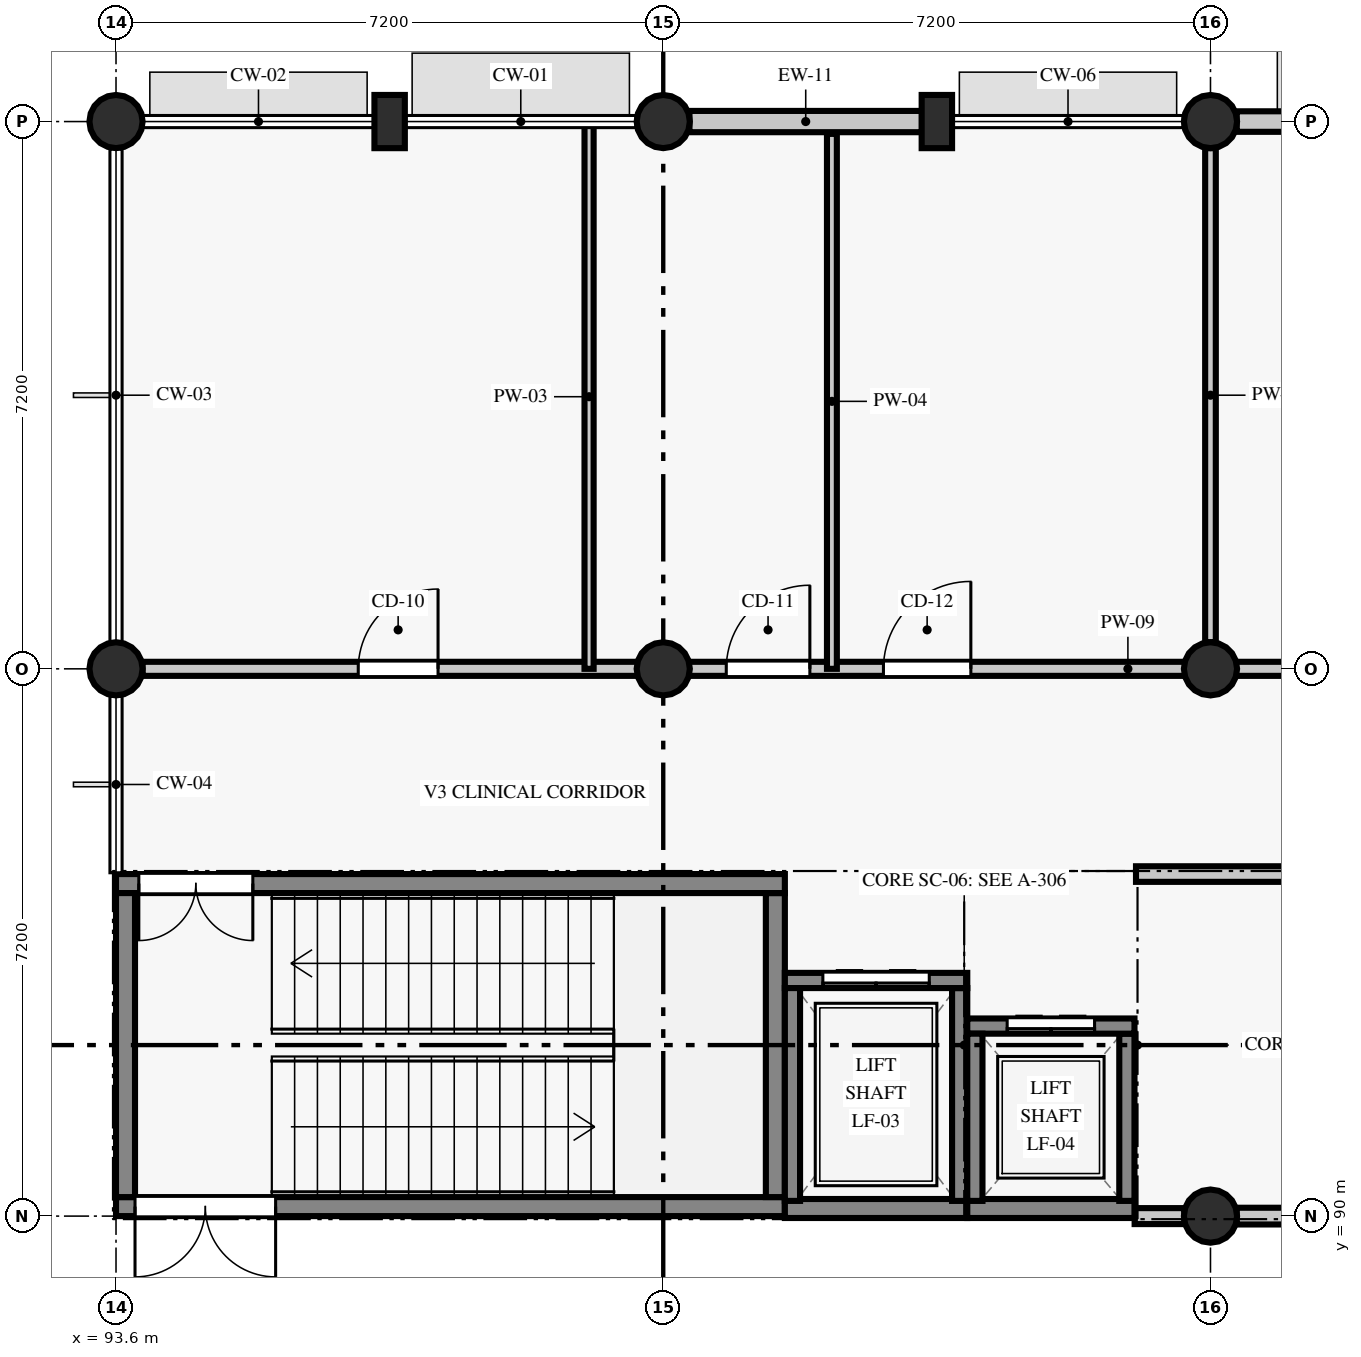
"""IFC4 building model, lengths in metres.
Left out: names, types, materials, properties, quantities, classifications, styles, units other than length and angle.
Written with IfcOpenShell. Run it as: python <this file> out.ifc"""

import sys

from ifc_helpers import new_model, si_unit, direction, frame, frame_2d, origin, origin_2d, place, context, subcontext, project, spatial, rectangle, circle, extrude, element, fill, save


model = new_model("IFC4")
c1 = context("Model", 3, precision=1e-05, world=origin(), true_north=direction((0.0, 1.0)))
c2 = subcontext(c1, "Body", "Model", "MODEL_VIEW")
j1 = project(units=[si_unit("LENGTHUNIT", "METRE"), si_unit("PLANEANGLEUNIT", "RADIAN")], contexts=[c1])
p1 = place(None, origin())
s1 = spatial("IfcSite", under=j1, at=p1, CompositionType="ELEMENT")
p2 = place(p1, origin())
s2 = spatial("IfcBuilding", under=s1, at=p2, CompositionType="ELEMENT")
p3 = place(p2, origin())
s3 = spatial("IfcBuildingStorey", under=s2, at=p3, CompositionType="ELEMENT", Elevation=0.0)
for number, where, z_axis, x_axis in (
    (1, (93.6, 97.2, 0.0), (0.0, 0.0, 1.0), (1.0, 0.0, 0.0)),
    (2, (93.6, 104.4, 0.0), (0.0, 0.0, 1.0), (1.0, 0.0, 0.0)),
    (3, (100.8, 97.2, 0.0), (0.0, 0.0, 1.0), (1.0, 0.0, 0.0)),
    (4, (100.8, 104.4, 0.0), (0.0, 0.0, 1.0), (1.0, 0.0, 0.0)),
    (5, (108.0, 90.0, 0.0), (0.0, 0.0, 1.0), (1.0, 0.0, 0.0)),
    (6, (108.0, 97.2, 0.0), (0.0, 0.0, 1.0), (1.0, 0.0, 0.0)),
    (7, (108.0, 104.4, 0.0), (0.0, 0.0, 1.0), (1.0, 0.0, 0.0)),
):
    element("IfcColumn", number, at=place(p3, frame(where, z_axis=z_axis, x_axis=x_axis)), inside=s3, PredefinedType="COLUMN", context=c2, shape_type="SweptSolid", body=[
        extrude(circle(Radius=0.35, at=origin_2d()), origin(), (0.0, 0.0, 1.0), 4.535),
    ])
for number, where, z_axis, x_axis in (
    (8, (97.2, 104.4, 0.0), (0.0, 0.0, 1.0), (1.0, 0.0, 0.0)),
    (9, (104.4, 104.4, 0.0), (0.0, 0.0, 1.0), (1.0, 0.0, 0.0)),
):
    element("IfcColumn", number, at=place(p3, frame(where, z_axis=z_axis, x_axis=x_axis)), inside=s3, PredefinedType="PILASTER", context=c2, shape_type="SweptSolid", body=[
        extrude(rectangle(XDim=0.4, YDim=0.7, at=origin_2d()), origin(), (0.0, 0.0, 1.0), 4.535),
    ])
p4 = place(p3, frame((107.002, 90.0, 0.0), z_axis=(0.0, 0.0, 1.0), x_axis=(1.0, 0.0, 0.0)))
e10 = element("IfcWall", 10, at=p4, inside=s3, PredefinedType="STANDARD", context=c2, shape_type="SweptSolid", body=[
    extrude(rectangle(XDim=0.653, YDim=0.21, at=frame_2d((0.327, 0.0))), origin(), (0.0, 0.0, 1.0), 4.535),
])
p5 = place(p3, frame((108.345, 90.0, 0.0), z_axis=(0.0, 0.0, 1.0), x_axis=(1.0, 0.0, 0.0)))
e11 = element("IfcWall", 11, at=p5, inside=s3, PredefinedType="STANDARD", context=c2, shape_type="SweptSolid", body=[
    extrude(rectangle(XDim=5.253, YDim=0.22, at=frame_2d((2.626, 0.0))), origin(), (0.0, 0.0, 1.0), 4.535),
])
p6 = place(p5, frame((1.677, 0.0, 0.0)))
e12 = element("IfcOpeningElement", 12, at=p6, cuts=e11, PredefinedType="OPENING", context=c2, shape_type="SweptSolid", body=[
    extrude(rectangle(XDim=1.9, YDim=2.28, at=frame_2d((0.95, 1.14))), frame((0.0, 0.12, 0.0), z_axis=(0.0, -1.0, 0.0), x_axis=(1.0, 0.0, 0.0)), (0.0, 0.0, 1.0), 0.24),
])
p7 = place(p3, frame((111.404, 104.4, 0.0), z_axis=(0.0, 0.0, 1.0), x_axis=(-1.0, 0.0, 0.0)))
e13 = element("IfcWall", 13, at=p7, inside=s3, PredefinedType="STANDARD", context=c2, shape_type="SweptSolid", body=[
    extrude(rectangle(XDim=3.059, YDim=0.27, at=frame_2d((1.53, 0.0))), origin(), (0.0, 0.0, 1.0), 2.9),
])
p8 = place(p7, frame((0.655, 0.0, 0.9)))
e14 = element("IfcOpeningElement", 14, at=p8, cuts=e13, PredefinedType="OPENING", context=c2, shape_type="SweptSolid", body=[
    extrude(rectangle(XDim=1.75, YDim=1.66, at=frame_2d((0.875, 0.83))), frame((0.0, 0.145, 0.0), z_axis=(0.0, -1.0, 0.0), x_axis=(1.0, 0.0, 0.0)), (0.0, 0.0, 1.0), 0.29),
])
p9 = place(p3, frame((104.204, 104.4, 0.0), z_axis=(0.0, 0.0, 1.0), x_axis=(-1.0, 0.0, 0.0)))
e15 = element("IfcWall", 15, at=p9, inside=s3, PredefinedType="STANDARD", context=c2, shape_type="SweptSolid", body=[
    extrude(rectangle(XDim=3.059, YDim=0.28, at=frame_2d((1.53, 0.0))), origin(), (0.0, 0.0, 1.0), 2.9),
])
p10 = place(p3, frame((93.6, 90.125, 0.0), z_axis=(0.0, 0.0, 1.0), x_axis=(1.0, 0.0, 0.0)))
e16 = element("IfcWall", 16, at=p10, inside=s3, PredefinedType="SHEAR", context=c2, shape_type="SweptSolid", body=[
    extrude(rectangle(XDim=8.8, YDim=0.25, at=frame_2d((4.4, 0.0))), origin(), (0.0, 0.0, 1.0), 4.535),
])
p11 = place(p10, frame((0.25, 0.0, 0.0)))
e17 = element("IfcOpeningElement", 17, at=p11, cuts=e16, PredefinedType="OPENING", context=c2, shape_type="SweptSolid", body=[
    extrude(rectangle(XDim=1.85, YDim=2.2, at=frame_2d((0.925, 1.1))), frame((0.0, 0.135, 0.0), z_axis=(0.0, -1.0, 0.0), x_axis=(1.0, 0.0, 0.0)), (0.0, 0.0, 1.0), 0.27),
])
p12 = place(p3, frame((102.275, 90.25, 0.0), z_axis=(0.0, 0.0, 1.0), x_axis=(0.0, 1.0, 0.0)))
e18 = element("IfcWall", 18, at=p12, inside=s3, PredefinedType="SHEAR", context=c2, shape_type="SweptSolid", body=[
    extrude(rectangle(XDim=4.0, YDim=0.25, at=frame_2d((2.0, 0.0))), origin(), (0.0, 0.0, 1.0), 4.535),
])
p13 = place(p3, frame((102.4, 94.375, 0.0), z_axis=(0.0, 0.0, 1.0), x_axis=(-1.0, 0.0, 0.0)))
e19 = element("IfcWall", 19, at=p13, inside=s3, PredefinedType="SHEAR", context=c2, shape_type="SweptSolid", body=[
    extrude(rectangle(XDim=8.8, YDim=0.25, at=frame_2d((4.4, 0.0))), origin(), (0.0, 0.0, 1.0), 4.535),
])
p14 = place(p13, frame((7.0, 0.0, 0.0)))
e20 = element("IfcOpeningElement", 20, at=p14, cuts=e19, PredefinedType="OPENING", context=c2, shape_type="SweptSolid", body=[
    extrude(rectangle(XDim=1.5, YDim=2.15, at=frame_2d((0.75, 1.075))), frame((0.0, 0.135, 0.0), z_axis=(0.0, -1.0, 0.0), x_axis=(1.0, 0.0, 0.0)), (0.0, 0.0, 1.0), 0.27),
])
p15 = place(p3, frame((93.725, 94.25, 0.0), z_axis=(0.0, 0.0, 1.0), x_axis=(0.0, -1.0, 0.0)))
e21 = element("IfcWall", 21, at=p15, inside=s3, PredefinedType="SHEAR", context=c2, shape_type="SweptSolid", body=[
    extrude(rectangle(XDim=4.0, YDim=0.25, at=frame_2d((2.0, 0.0))), origin(), (0.0, 0.0, 1.0), 4.535),
])
p16 = place(p3, frame((102.4, 90.1, 0.0), z_axis=(0.0, 0.0, 1.0), x_axis=(1.0, 0.0, 0.0)))
e22 = element("IfcWall", 22, at=p16, inside=s3, PredefinedType="SHEAR", context=c2, shape_type="SweptSolid", body=[
    extrude(rectangle(XDim=2.4, YDim=0.25, at=frame_2d((1.2, 0.0))), origin(), (0.0, 0.0, 1.0), 4.535),
])
p17 = place(p3, frame((104.7, 90.2, 0.0), z_axis=(0.0, 0.0, 1.0), x_axis=(0.0, 1.0, 0.0)))
e23 = element("IfcWall", 23, at=p17, inside=s3, PredefinedType="SHEAR", context=c2, shape_type="SweptSolid", body=[
    extrude(rectangle(XDim=2.8, YDim=0.2, at=frame_2d((1.4, 0.0))), origin(), (0.0, 0.0, 1.0), 4.535),
])
p18 = place(p3, frame((104.8, 93.1, 0.0), z_axis=(0.0, 0.0, 1.0), x_axis=(-1.0, 0.0, 0.0)))
e24 = element("IfcWall", 24, at=p18, inside=s3, PredefinedType="SHEAR", context=c2, shape_type="SweptSolid", body=[
    extrude(rectangle(XDim=2.4, YDim=0.2, at=frame_2d((1.2, 0.0))), origin(), (0.0, 0.0, 1.0), 4.535),
])
p19 = place(p18, frame((0.5, 0.0, 0.0)))
e25 = element("IfcOpeningElement", 25, at=p19, cuts=e24, PredefinedType="OPENING", context=c2, shape_type="SweptSolid", body=[
    extrude(rectangle(XDim=1.4, YDim=2.15, at=frame_2d((0.7, 1.075))), frame((0.0, 0.11, 0.0), z_axis=(0.0, -1.0, 0.0), x_axis=(1.0, 0.0, 0.0)), (0.0, 0.0, 1.0), 0.22),
])
p20 = place(p3, frame((102.5, 93.0, 0.0), z_axis=(0.0, 0.0, 1.0), x_axis=(0.0, -1.0, 0.0)))
e26 = element("IfcWall", 26, at=p20, inside=s3, PredefinedType="SHEAR", context=c2, shape_type="SweptSolid", body=[
    extrude(rectangle(XDim=2.8, YDim=0.2, at=frame_2d((1.4, 0.0))), origin(), (0.0, 0.0, 1.0), 4.535),
])
p21 = place(p3, frame((104.8, 90.1, 0.0), z_axis=(0.0, 0.0, 1.0), x_axis=(1.0, 0.0, 0.0)))
e27 = element("IfcWall", 27, at=p21, inside=s3, PredefinedType="SHEAR", context=c2, shape_type="SweptSolid", body=[
    extrude(rectangle(XDim=2.2, YDim=0.25, at=frame_2d((1.1, 0.0))), origin(), (0.0, 0.0, 1.0), 4.535),
])
p22 = place(p3, frame((106.9, 90.2, 0.0), z_axis=(0.0, 0.0, 1.0), x_axis=(0.0, 1.0, 0.0)))
e28 = element("IfcWall", 28, at=p22, inside=s3, PredefinedType="SHEAR", context=c2, shape_type="SweptSolid", body=[
    extrude(rectangle(XDim=2.2, YDim=0.2, at=frame_2d((1.1, 0.0))), origin(), (0.0, 0.0, 1.0), 4.535),
])
p23 = place(p3, frame((107.0, 92.5, 0.0), z_axis=(0.0, 0.0, 1.0), x_axis=(-1.0, 0.0, 0.0)))
e29 = element("IfcWall", 29, at=p23, inside=s3, PredefinedType="SHEAR", context=c2, shape_type="SweptSolid", body=[
    extrude(rectangle(XDim=2.2, YDim=0.2, at=frame_2d((1.1, 0.0))), origin(), (0.0, 0.0, 1.0), 4.535),
])
p24 = place(p23, frame((0.525, 0.0, 0.0)))
e30 = element("IfcOpeningElement", 30, at=p24, cuts=e29, PredefinedType="OPENING", context=c2, shape_type="SweptSolid", body=[
    extrude(rectangle(XDim=1.15, YDim=2.15, at=frame_2d((0.575, 1.075))), frame((0.0, 0.11, 0.0), z_axis=(0.0, -1.0, 0.0), x_axis=(1.0, 0.0, 0.0)), (0.0, 0.0, 1.0), 0.22),
])
p25 = place(p3, frame((104.9, 92.4, 0.0), z_axis=(0.0, 0.0, 1.0), x_axis=(0.0, -1.0, 0.0)))
e31 = element("IfcWall", 31, at=p25, inside=s3, PredefinedType="SHEAR", context=c2, shape_type="SweptSolid", body=[
    extrude(rectangle(XDim=2.2, YDim=0.2, at=frame_2d((1.1, 0.0))), origin(), (0.0, 0.0, 1.0), 4.535),
])
p26 = place(p3, frame((93.95, 97.2, 0.0), z_axis=(0.0, 0.0, 1.0), x_axis=(1.0, 0.0, 0.0)))
e32 = element("IfcWall", 32, at=p26, inside=s3, PredefinedType="PARTITIONING", context=c2, shape_type="SweptSolid", body=[
    extrude(rectangle(XDim=28.1, YDim=0.185, at=frame_2d((14.05, 0.0))), origin(), (0.0, 0.0, 1.0), 3.785),
])
p27 = place(p26, frame((2.837, 0.0, 0.0)))
e33 = element("IfcOpeningElement", 33, at=p27, cuts=e32, PredefinedType="OPENING", context=c2, shape_type="SweptSolid", body=[
    extrude(rectangle(XDim=1.05, YDim=2.13, at=frame_2d((0.525, 1.065))), frame((0.0, 0.103, 0.0), z_axis=(0.0, -1.0, 0.0), x_axis=(1.0, 0.0, 0.0)), (0.0, 0.0, 1.0), 0.205),
])
p28 = place(p26, frame((7.679, 0.0, 0.0)))
e34 = element("IfcOpeningElement", 34, at=p28, cuts=e32, PredefinedType="OPENING", context=c2, shape_type="SweptSolid", body=[
    extrude(rectangle(XDim=1.1, YDim=2.13, at=frame_2d((0.55, 1.065))), frame((0.0, 0.103, 0.0), z_axis=(0.0, -1.0, 0.0), x_axis=(1.0, 0.0, 0.0)), (0.0, 0.0, 1.0), 0.205),
])
p29 = place(p26, frame((9.747, 0.0, 0.0)))
e35 = element("IfcOpeningElement", 35, at=p29, cuts=e32, PredefinedType="OPENING", context=c2, shape_type="SweptSolid", body=[
    extrude(rectangle(XDim=1.15, YDim=2.13, at=frame_2d((0.575, 1.065))), frame((0.0, 0.103, 0.0), z_axis=(0.0, -1.0, 0.0), x_axis=(1.0, 0.0, 0.0)), (0.0, 0.0, 1.0), 0.205),
])
p30 = place(p26, frame((15.03, 0.0, 0.0)))
e36 = element("IfcOpeningElement", 36, at=p30, cuts=e32, PredefinedType="OPENING", context=c2, shape_type="SweptSolid", body=[
    extrude(rectangle(XDim=0.92, YDim=2.18, at=frame_2d((0.46, 1.09))), frame((0.0, 0.103, 0.0), z_axis=(0.0, -1.0, 0.0), x_axis=(1.0, 0.0, 0.0)), (0.0, 0.0, 1.0), 0.205),
])
p31 = place(p26, frame((17.15, 0.0, 0.0)))
e37 = element("IfcOpeningElement", 37, at=p31, cuts=e32, PredefinedType="OPENING", context=c2, shape_type="SweptSolid", body=[
    extrude(rectangle(XDim=0.94, YDim=2.08, at=frame_2d((0.47, 1.04))), frame((0.0, 0.103, 0.0), z_axis=(0.0, -1.0, 0.0), x_axis=(1.0, 0.0, 0.0)), (0.0, 0.0, 1.0), 0.205),
])
p32 = place(p26, frame((19.36, 0.0, 0.0)))
e38 = element("IfcOpeningElement", 38, at=p32, cuts=e32, PredefinedType="OPENING", context=c2, shape_type="SweptSolid", body=[
    extrude(rectangle(XDim=0.9, YDim=2.08, at=frame_2d((0.45, 1.04))), frame((0.0, 0.103, 0.0), z_axis=(0.0, -1.0, 0.0), x_axis=(1.0, 0.0, 0.0)), (0.0, 0.0, 1.0), 0.205),
])
p33 = place(p26, frame((23.167, 0.0, 0.0)))
e39 = element("IfcOpeningElement", 39, at=p33, cuts=e32, PredefinedType="OPENING", context=c2, shape_type="SweptSolid", body=[
    extrude(rectangle(XDim=1.08, YDim=2.18, at=frame_2d((0.54, 1.09))), frame((0.0, 0.103, 0.0), z_axis=(0.0, -1.0, 0.0), x_axis=(1.0, 0.0, 0.0)), (0.0, 0.0, 1.0), 0.205),
])
p34 = place(p26, frame((25.072, 0.0, 0.0)))
e40 = element("IfcOpeningElement", 40, at=p34, cuts=e32, PredefinedType="OPENING", context=c2, shape_type="SweptSolid", body=[
    extrude(rectangle(XDim=1.13, YDim=2.18, at=frame_2d((0.565, 1.09))), frame((0.0, 0.103, 0.0), z_axis=(0.0, -1.0, 0.0), x_axis=(1.0, 0.0, 0.0)), (0.0, 0.0, 1.0), 0.205),
])
p35 = place(p3, frame((99.824, 97.2, 0.0), z_axis=(0.0, 0.0, 1.0), x_axis=(0.0, 1.0, 0.0)))
e41 = element("IfcWall", 41, at=p35, inside=s3, PredefinedType="PARTITIONING", context=c2, shape_type="SweptSolid", body=[
    extrude(rectangle(XDim=7.16, YDim=0.12, at=frame_2d((3.58, 0.0))), origin(), (0.0, 0.0, 1.0), 3.785),
])
p36 = place(p3, frame((103.019, 97.2, 0.0), z_axis=(0.0, 0.0, 1.0), x_axis=(0.0, 1.0, 0.0)))
e42 = element("IfcWall", 42, at=p36, inside=s3, PredefinedType="PARTITIONING", context=c2, shape_type="SweptSolid", body=[
    extrude(rectangle(XDim=7.038, YDim=0.13, at=frame_2d((3.519, 0.0))), origin(), (0.0, 0.0, 1.0), 3.785),
])
p37 = place(p3, frame((108.0, 97.55, 0.0), z_axis=(0.0, 0.0, 1.0), x_axis=(0.0, 1.0, 0.0)))
e43 = element("IfcWall", 43, at=p37, inside=s3, PredefinedType="PARTITIONING", context=c2, shape_type="SweptSolid", body=[
    extrude(rectangle(XDim=6.5, YDim=0.14, at=frame_2d((3.25, 0.0))), origin(), (0.0, 0.0, 1.0), 3.985),
])
p38 = place(p3, frame((107.02, 94.5, 0.0), z_axis=(0.0, 0.0, 1.0), x_axis=(1.0, 0.0, 0.0)))
e44 = element("IfcWall", 44, at=p38, inside=s3, PredefinedType="PARTITIONING", context=c2, shape_type="SweptSolid", body=[
    extrude(rectangle(XDim=6.56, YDim=0.205, at=frame_2d((3.28, 0.0))), origin(), (0.0, 0.0, 1.0), 3.985),
])
p39 = place(p38, frame((3.93, 0.0, 0.0)))
e45 = element("IfcOpeningElement", 45, at=p39, cuts=e44, PredefinedType="OPENING", context=c2, shape_type="SweptSolid", body=[
    extrude(rectangle(XDim=1.18, YDim=2.18, at=frame_2d((0.59, 1.09))), frame((0.0, 0.113, 0.0), z_axis=(0.0, -1.0, 0.0), x_axis=(1.0, 0.0, 0.0)), (0.0, 0.0, 1.0), 0.225),
])
p40 = place(p11, frame((1.85, 0.0, 0.0), z_axis=(0.0, 0.0, 1.0), x_axis=(-1.0, 0.0, 0.0)))
e46 = element("IfcDoor", 46, at=p40, inside=s3, OperationType="DOUBLE_DOOR_SINGLE_SWING", PredefinedType="DOOR", context=c2, shape_type="SweptSolid", body=[
    extrude(rectangle(XDim=1.85, YDim=2.2, at=frame_2d((0.925, 1.1))), frame((0.0, 0.025, 0.0), z_axis=(0.0, -1.0, 0.0), x_axis=(1.0, 0.0, 0.0)), (0.0, 0.0, 1.0), 0.05),
])
fill(e17, e46)
p41 = place(p14, origin())
e47 = element("IfcDoor", 47, at=p41, inside=s3, OperationType="DOUBLE_DOOR_SINGLE_SWING", PredefinedType="DOOR", context=c2, shape_type="SweptSolid", body=[
    extrude(rectangle(XDim=1.5, YDim=2.15, at=frame_2d((0.75, 1.075))), frame((0.0, 0.025, 0.0), z_axis=(0.0, -1.0, 0.0), x_axis=(1.0, 0.0, 0.0)), (0.0, 0.0, 1.0), 0.05),
])
fill(e20, e47)
p42 = place(p19, frame((1.4, 0.0, 0.0), z_axis=(0.0, 0.0, 1.0), x_axis=(-1.0, 0.0, 0.0)))
e48 = element("IfcDoor", 48, at=p42, inside=s3, OperationType="DOUBLE_DOOR_SLIDING", PredefinedType="DOOR", context=c2, shape_type="SweptSolid", body=[
    extrude(rectangle(XDim=1.4, YDim=2.15, at=frame_2d((0.7, 1.075))), frame((0.0, 0.025, 0.0), z_axis=(0.0, -1.0, 0.0), x_axis=(1.0, 0.0, 0.0)), (0.0, 0.0, 1.0), 0.05),
])
fill(e25, e48)
p43 = place(p24, frame((1.15, 0.0, 0.0), z_axis=(0.0, 0.0, 1.0), x_axis=(-1.0, 0.0, 0.0)))
e49 = element("IfcDoor", 49, at=p43, inside=s3, OperationType="DOUBLE_DOOR_SLIDING", PredefinedType="DOOR", context=c2, shape_type="SweptSolid", body=[
    extrude(rectangle(XDim=1.15, YDim=2.15, at=frame_2d((0.575, 1.075))), frame((0.0, 0.025, 0.0), z_axis=(0.0, -1.0, 0.0), x_axis=(1.0, 0.0, 0.0)), (0.0, 0.0, 1.0), 0.05),
])
fill(e30, e49)
p44 = place(p27, origin())
e50 = element("IfcDoor", 50, at=p44, inside=s3, OperationType="SINGLE_SWING_RIGHT", PredefinedType="DOOR", context=c2, shape_type="SweptSolid", body=[
    extrude(rectangle(XDim=1.05, YDim=2.13, at=frame_2d((0.525, 1.065))), frame((0.0, 0.025, 0.0), z_axis=(0.0, -1.0, 0.0), x_axis=(1.0, 0.0, 0.0)), (0.0, 0.0, 1.0), 0.05),
])
fill(e33, e50)
p45 = place(p28, origin())
e51 = element("IfcDoor", 51, at=p45, inside=s3, OperationType="SINGLE_SWING_RIGHT", PredefinedType="DOOR", context=c2, shape_type="SweptSolid", body=[
    extrude(rectangle(XDim=1.1, YDim=2.13, at=frame_2d((0.55, 1.065))), frame((0.0, 0.025, 0.0), z_axis=(0.0, -1.0, 0.0), x_axis=(1.0, 0.0, 0.0)), (0.0, 0.0, 1.0), 0.05),
])
fill(e34, e51)
p46 = place(p29, origin())
e52 = element("IfcDoor", 52, at=p46, inside=s3, OperationType="SINGLE_SWING_RIGHT", PredefinedType="DOOR", context=c2, shape_type="SweptSolid", body=[
    extrude(rectangle(XDim=1.15, YDim=2.13, at=frame_2d((0.575, 1.065))), frame((0.0, 0.025, 0.0), z_axis=(0.0, -1.0, 0.0), x_axis=(1.0, 0.0, 0.0)), (0.0, 0.0, 1.0), 0.05),
])
fill(e35, e52)
save(model, sys.argv[1])
